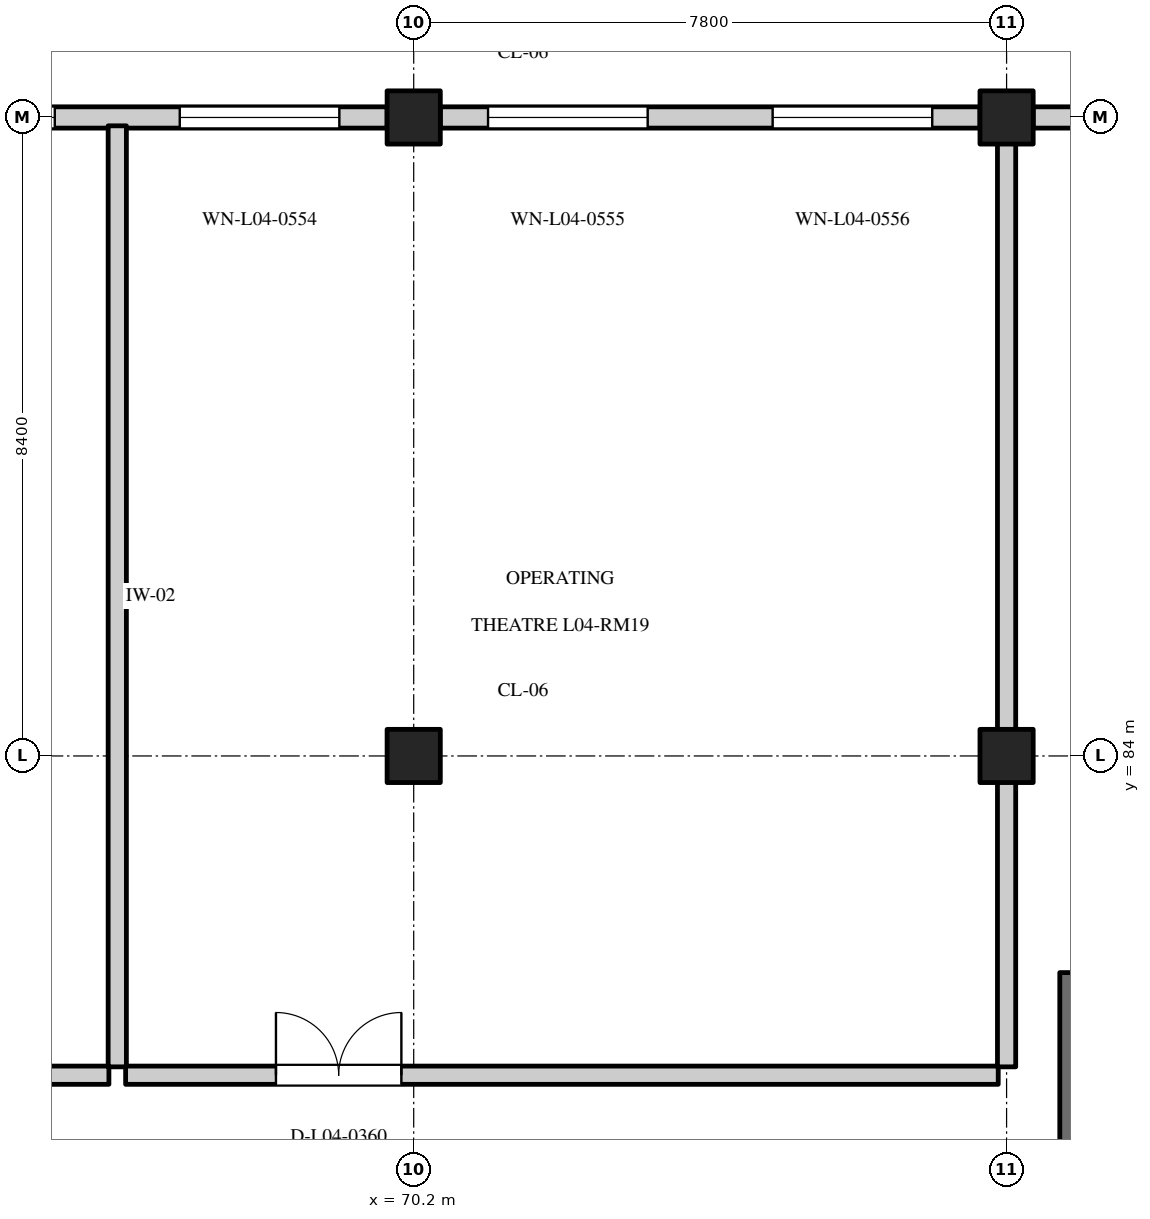
"""IFC4 building model, lengths in metres.
Left out: names, types, materials, properties, quantities, classifications, styles, units other than length and angle.
Written with IfcOpenShell. Run it as: python <this file> out.ifc"""

import sys

from ifc_helpers import new_model, si_unit, direction, frame, frame_2d, origin, origin_2d, place, context, subcontext, project, spatial, rectangle, extrude, element, fill, save


model = new_model("IFC4")
c1 = context("Model", 3, precision=1e-05, world=origin(), true_north=direction((0.0, 1.0)))
c2 = subcontext(c1, "Body", "Model", "MODEL_VIEW")
j1 = project(units=[si_unit("LENGTHUNIT", "METRE"), si_unit("PLANEANGLEUNIT", "RADIAN")], contexts=[c1])
p1 = place(None, origin())
s1 = spatial("IfcSite", under=j1, at=p1, CompositionType="ELEMENT")
p2 = place(p1, origin())
s2 = spatial("IfcBuilding", under=s1, at=p2, CompositionType="ELEMENT")
p3 = place(p2, frame((0.0, 0.0, 18.0)))
s3 = spatial("IfcBuildingStorey", under=s2, at=p3, CompositionType="ELEMENT", Elevation=18.0)
for number, where, z_axis, x_axis in (
    (1, (70.2, 84.0, 0.0), (0.0, 0.0, 1.0), (1.0, 0.0, 0.0)),
    (2, (70.2, 92.4, 0.0), (0.0, 0.0, 1.0), (1.0, 0.0, 0.0)),
    (3, (78.0, 84.0, 0.0), (0.0, 0.0, 1.0), (1.0, 0.0, 0.0)),
    (4, (78.0, 92.4, 0.0), (0.0, 0.0, 1.0), (1.0, 0.0, 0.0)),
):
    element("IfcColumn", number, at=place(p3, frame(where, z_axis=z_axis, x_axis=x_axis)), inside=s3, PredefinedType="COLUMN", context=c2, shape_type="SweptSolid", body=[
        extrude(rectangle(XDim=0.7, YDim=0.7, at=origin_2d()), origin(), (0.0, 0.0, 1.0), 4.2),
    ])
p4 = place(p3, frame((62.75, 92.4, 0.0), z_axis=(0.0, 0.0, 1.0), x_axis=(1.0, 0.0, 0.0)))
e5 = element("IfcWall", 5, at=p4, inside=s3, PredefinedType="STANDARD", context=c2, shape_type="SweptSolid", body=[
    extrude(rectangle(XDim=7.1, YDim=0.28, at=frame_2d((3.55, 0.0))), origin(), (0.0, 0.0, 1.0), 3.335),
])
p5 = place(p4, frame((0.628, 0.0, 0.8)))
e6 = element("IfcOpeningElement", 6, at=p5, cuts=e5, PredefinedType="OPENING", context=c2, shape_type="SweptSolid", body=[
    extrude(rectangle(XDim=2.1, YDim=1.75, at=frame_2d((1.05, 0.875))), frame((0.0, 0.152, 0.0), z_axis=(0.0, -1.0, 0.0), x_axis=(1.0, 0.0, 0.0)), (0.0, 0.0, 1.0), 0.304),
])
p6 = place(p4, frame((4.372, 0.0, 0.8)))
e7 = element("IfcOpeningElement", 7, at=p6, cuts=e5, PredefinedType="OPENING", context=c2, shape_type="SweptSolid", body=[
    extrude(rectangle(XDim=2.1, YDim=1.75, at=frame_2d((1.05, 0.875))), frame((0.0, 0.152, 0.0), z_axis=(0.0, -1.0, 0.0), x_axis=(1.0, 0.0, 0.0)), (0.0, 0.0, 1.0), 0.304),
])
p7 = place(p3, frame((70.55, 92.4, 0.0), z_axis=(0.0, 0.0, 1.0), x_axis=(1.0, 0.0, 0.0)))
e8 = element("IfcWall", 8, at=p7, inside=s3, PredefinedType="STANDARD", context=c2, shape_type="SweptSolid", body=[
    extrude(rectangle(XDim=7.1, YDim=0.28, at=frame_2d((3.55, 0.0))), origin(), (0.0, 0.0, 1.0), 3.335),
])
p8 = place(p7, frame((0.628, 0.0, 0.8)))
e9 = element("IfcOpeningElement", 9, at=p8, cuts=e8, PredefinedType="OPENING", context=c2, shape_type="SweptSolid", body=[
    extrude(rectangle(XDim=2.1, YDim=1.65, at=frame_2d((1.05, 0.825))), frame((0.0, 0.152, 0.0), z_axis=(0.0, -1.0, 0.0), x_axis=(1.0, 0.0, 0.0)), (0.0, 0.0, 1.0), 0.304),
])
p9 = place(p7, frame((4.372, 0.0, 0.8)))
e10 = element("IfcOpeningElement", 10, at=p9, cuts=e8, PredefinedType="OPENING", context=c2, shape_type="SweptSolid", body=[
    extrude(rectangle(XDim=2.1, YDim=1.65, at=frame_2d((1.05, 0.825))), frame((0.0, 0.152, 0.0), z_axis=(0.0, -1.0, 0.0), x_axis=(1.0, 0.0, 0.0)), (0.0, 0.0, 1.0), 0.304),
])
p10 = place(p3, frame((78.35, 92.4, 0.0), z_axis=(0.0, 0.0, 1.0), x_axis=(1.0, 0.0, 0.0)))
e11 = element("IfcWall", 11, at=p10, inside=s3, PredefinedType="STANDARD", context=c2, shape_type="SweptSolid", body=[
    extrude(rectangle(XDim=7.1, YDim=0.28, at=frame_2d((3.55, 0.0))), origin(), (0.0, 0.0, 1.0), 3.335),
])
p11 = place(p10, frame((0.628, 0.0, 0.8)))
e12 = element("IfcOpeningElement", 12, at=p11, cuts=e11, PredefinedType="OPENING", context=c2, shape_type="SweptSolid", body=[
    extrude(rectangle(XDim=2.1, YDim=1.55, at=frame_2d((1.05, 0.775))), frame((0.0, 0.152, 0.0), z_axis=(0.0, -1.0, 0.0), x_axis=(1.0, 0.0, 0.0)), (0.0, 0.0, 1.0), 0.304),
])
p12 = place(p10, frame((4.102, 0.0, 0.8)))
e13 = element("IfcOpeningElement", 13, at=p12, cuts=e11, PredefinedType="OPENING", context=c2, shape_type="SweptSolid", body=[
    extrude(rectangle(XDim=1.6, YDim=1.65, at=frame_2d((0.8, 0.825))), frame((0.0, 0.152, 0.0), z_axis=(0.0, -1.0, 0.0), x_axis=(1.0, 0.0, 0.0)), (0.0, 0.0, 1.0), 0.304),
])
p13 = place(p3, frame((78.875, 70.65, 0.0), z_axis=(0.0, 0.0, 1.0), x_axis=(0.0, 1.0, 0.0)))
e14 = element("IfcWall", 14, at=p13, inside=s3, PredefinedType="SHEAR", context=c2, shape_type="SweptSolid", body=[
    extrude(rectangle(XDim=10.5, YDim=0.35, at=frame_2d((5.25, 0.0))), origin(), (0.0, 0.0, 1.0), 3.885),
])
p14 = place(p3, frame((54.71, 79.8, 0.0), z_axis=(0.0, 0.0, 1.0), x_axis=(1.0, 0.0, 0.0)))
e15 = element("IfcWall", 15, at=p14, inside=s3, PredefinedType="STANDARD", context=c2, shape_type="SweptSolid", body=[
    extrude(rectangle(XDim=11.48, YDim=0.24, at=frame_2d((5.74, 0.0))), origin(), (0.0, 0.0, 1.0), 3.865),
])
p15 = place(p14, frame((1.978, 0.0, 0.0)))
e16 = element("IfcOpeningElement", 16, at=p15, cuts=e15, PredefinedType="OPENING", context=c2, shape_type="SweptSolid", body=[
    extrude(rectangle(XDim=1.65, YDim=2.25, at=frame_2d((0.825, 1.125))), frame((0.0, 0.132, 0.0), z_axis=(0.0, -1.0, 0.0), x_axis=(1.0, 0.0, 0.0)), (0.0, 0.0, 1.0), 0.264),
])
p16 = place(p3, frame((66.3, 79.91, 0.0), z_axis=(0.0, 0.0, 1.0), x_axis=(0.0, 1.0, 0.0)))
e17 = element("IfcWall", 17, at=p16, inside=s3, PredefinedType="STANDARD", context=c2, shape_type="SweptSolid", body=[
    extrude(rectangle(XDim=12.38, YDim=0.24, at=frame_2d((6.19, 0.0))), origin(), (0.0, 0.0, 1.0), 3.865),
])
p17 = place(p3, frame((66.41, 79.8, 0.0), z_axis=(0.0, 0.0, 1.0), x_axis=(1.0, 0.0, 0.0)))
e18 = element("IfcWall", 18, at=p17, inside=s3, PredefinedType="STANDARD", context=c2, shape_type="SweptSolid", body=[
    extrude(rectangle(XDim=11.48, YDim=0.24, at=frame_2d((5.74, 0.0))), origin(), (0.0, 0.0, 1.0), 3.865),
])
p18 = place(p17, frame((1.978, 0.0, 0.0)))
e19 = element("IfcOpeningElement", 19, at=p18, cuts=e18, PredefinedType="OPENING", context=c2, shape_type="SweptSolid", body=[
    extrude(rectangle(XDim=1.65, YDim=2.25, at=frame_2d((0.825, 1.125))), frame((0.0, 0.132, 0.0), z_axis=(0.0, -1.0, 0.0), x_axis=(1.0, 0.0, 0.0)), (0.0, 0.0, 1.0), 0.264),
])
p19 = place(p3, frame((69.89, 92.4, 0.0), z_axis=(0.0, 0.0, 1.0), x_axis=(1.0, 0.0, 0.0)))
e20 = element("IfcWall", 20, at=p19, inside=s3, PredefinedType="STANDARD", context=c2, shape_type="SweptSolid", body=[
    extrude(rectangle(XDim=0.62, YDim=0.24, at=frame_2d((0.31, 0.0))), origin(), (0.0, 0.0, 1.0), 3.235),
])
p20 = place(p3, frame((78.0, 79.91, 0.0), z_axis=(0.0, 0.0, 1.0), x_axis=(0.0, 1.0, 0.0)))
e21 = element("IfcWall", 21, at=p20, inside=s3, PredefinedType="STANDARD", context=c2, shape_type="SweptSolid", body=[
    extrude(rectangle(XDim=12.38, YDim=0.24, at=frame_2d((6.19, 0.0))), origin(), (0.0, 0.0, 1.0), 3.235),
])
p21 = place(p5, origin())
e22 = element("IfcWindow", 22, at=p21, inside=s3, PartitioningType="DOUBLE_PANEL_VERTICAL", PredefinedType="WINDOW", context=c2, shape_type="SweptSolid", body=[
    extrude(rectangle(XDim=2.1, YDim=1.75, at=frame_2d((1.05, 0.875))), frame((0.0, 0.03, 0.0), z_axis=(0.0, -1.0, 0.0), x_axis=(1.0, 0.0, 0.0)), (0.0, 0.0, 1.0), 0.06),
])
fill(e6, e22)
p22 = place(p6, origin())
e23 = element("IfcWindow", 23, at=p22, inside=s3, PartitioningType="DOUBLE_PANEL_VERTICAL", PredefinedType="WINDOW", context=c2, shape_type="SweptSolid", body=[
    extrude(rectangle(XDim=2.1, YDim=1.75, at=frame_2d((1.05, 0.875))), frame((0.0, 0.03, 0.0), z_axis=(0.0, -1.0, 0.0), x_axis=(1.0, 0.0, 0.0)), (0.0, 0.0, 1.0), 0.06),
])
fill(e7, e23)
p23 = place(p8, origin())
e24 = element("IfcWindow", 24, at=p23, inside=s3, PartitioningType="DOUBLE_PANEL_VERTICAL", PredefinedType="WINDOW", context=c2, shape_type="SweptSolid", body=[
    extrude(rectangle(XDim=2.1, YDim=1.65, at=frame_2d((1.05, 0.825))), frame((0.0, 0.03, 0.0), z_axis=(0.0, -1.0, 0.0), x_axis=(1.0, 0.0, 0.0)), (0.0, 0.0, 1.0), 0.06),
])
fill(e9, e24)
p24 = place(p9, origin())
e25 = element("IfcWindow", 25, at=p24, inside=s3, PartitioningType="DOUBLE_PANEL_VERTICAL", PredefinedType="WINDOW", context=c2, shape_type="SweptSolid", body=[
    extrude(rectangle(XDim=2.1, YDim=1.65, at=frame_2d((1.05, 0.825))), frame((0.0, 0.03, 0.0), z_axis=(0.0, -1.0, 0.0), x_axis=(1.0, 0.0, 0.0)), (0.0, 0.0, 1.0), 0.06),
])
fill(e10, e25)
p25 = place(p18, origin())
e26 = element("IfcDoor", 26, at=p25, inside=s3, OperationType="DOUBLE_DOOR_SINGLE_SWING", PredefinedType="DOOR", context=c2, shape_type="SweptSolid", body=[
    extrude(rectangle(XDim=1.65, YDim=2.25, at=frame_2d((0.825, 1.125))), frame((0.0, 0.025, 0.0), z_axis=(0.0, -1.0, 0.0), x_axis=(1.0, 0.0, 0.0)), (0.0, 0.0, 1.0), 0.05),
])
fill(e19, e26)
save(model, sys.argv[1])
